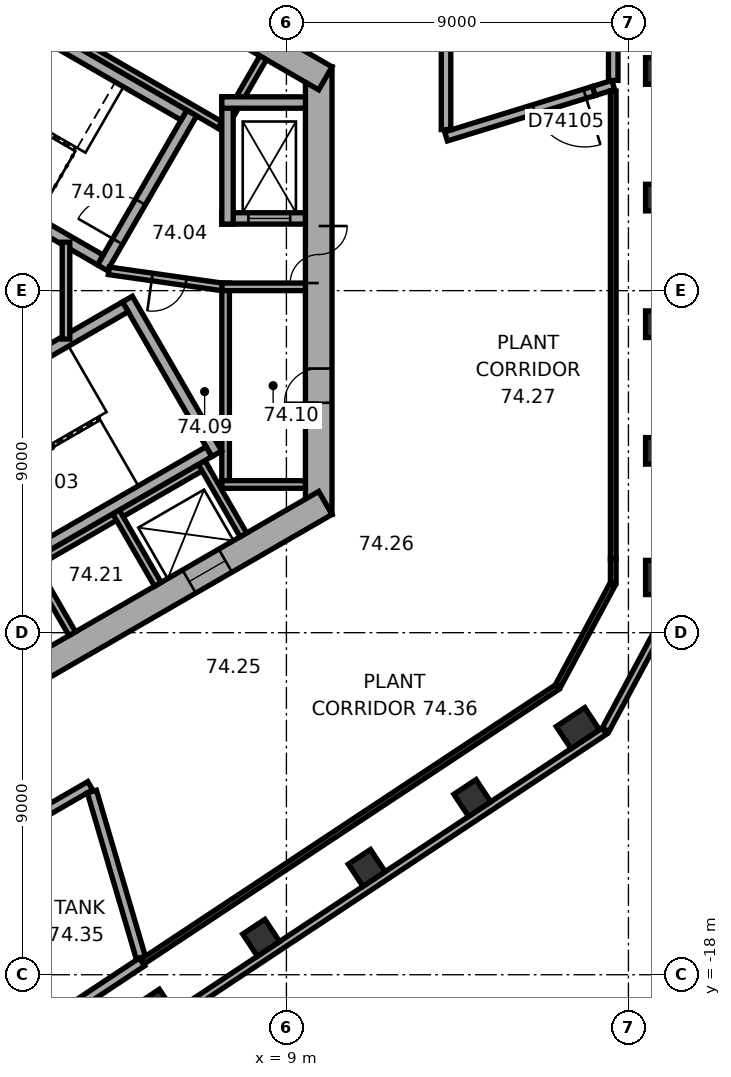
"""IFC4 building model, lengths in metres.
Left out: names, types, materials, properties, quantities, classifications, styles, units other than length and angle.
Written with IfcOpenShell. Run it as: python <this file> out.ifc"""

import sys

from ifc_helpers import new_model, si_unit, direction, frame, frame_2d, origin, origin_2d, place, context, subcontext, project, spatial, rectangle, extrude, element, fill, save


model = new_model("IFC4")
c1 = context("Model", 3, precision=1e-05, world=origin(), true_north=direction((0.0, 1.0)))
c2 = subcontext(c1, "Body", "Model", "MODEL_VIEW")
j1 = project(units=[si_unit("LENGTHUNIT", "METRE"), si_unit("PLANEANGLEUNIT", "RADIAN")], contexts=[c1])
p1 = place(None, origin())
s1 = spatial("IfcSite", under=j1, at=p1, CompositionType="ELEMENT")
p2 = place(p1, origin())
s2 = spatial("IfcBuilding", under=s1, at=p2, CompositionType="ELEMENT")
p3 = place(p2, frame((0.0, 0.0, 300.5)))
s3 = spatial("IfcBuildingStorey", under=s2, at=p3, CompositionType="ELEMENT", Elevation=300.5)
p4 = place(p3, frame((18.8, -7.547, 0.0), z_axis=(0.0, 0.0, 1.0), x_axis=(0.0, 1.0, 0.0)))
e1 = element("IfcColumn", 1, at=p4, inside=s3, PredefinedType="COLUMN", context=c2, shape_type="SweptSolid", body=[
    extrude(rectangle(XDim=0.9, YDim=0.7, at=origin_2d()), origin(), (0.0, 0.0, 1.0), 4.5),
])
for number, where, z_axis, x_axis in (
    (2, (18.8, -4.215, 0.0), (0.0, 0.0, 1.0), (0.0, 1.0, 0.0)),
    (3, (18.8, -0.883, 0.0), (0.0, 0.0, 1.0), (0.0, 1.0, 0.0)),
    (4, (18.8, 2.448, 0.0), (0.0, 0.0, 1.0), (0.0, 1.0, 0.0)),
    (5, (18.8, 5.78, 0.0), (0.0, 0.0, 1.0), (0.0, 1.0, 0.0)),
    (6, (5.557, -18.867, 0.0), (0.0, 0.0, 1.0), (0.834, 0.552, 0.0)),
    (7, (8.335, -17.028, 0.0), (0.0, 0.0, 1.0), (0.834, 0.552, 0.0)),
    (8, (11.113, -15.189, 0.0), (0.0, 0.0, 1.0), (0.834, 0.552, 0.0)),
    (9, (13.891, -13.351, 0.0), (0.0, 0.0, 1.0), (0.834, 0.552, 0.0)),
):
    element("IfcColumn", number, at=place(p3, frame(where, z_axis=z_axis, x_axis=x_axis)), inside=s3, PredefinedType="COLUMN", context=c2, shape_type="SweptSolid", body=[
        extrude(rectangle(XDim=0.7, YDim=0.7, at=origin_2d()), origin(), (0.0, 0.0, 1.0), 4.5),
    ])
p5 = place(p3, frame((16.669, -11.512, 0.0), z_axis=(0.0, 0.0, 1.0), x_axis=(0.833885822067, 0.551936985312, 0.0)))
e10 = element("IfcColumn", 10, at=p5, inside=s3, PredefinedType="COLUMN", context=c2, shape_type="SweptSolid", body=[
    extrude(rectangle(XDim=0.9, YDim=0.7, at=origin_2d()), origin(), (0.0, 0.0, 1.0), 4.5),
])
p6 = place(p3, frame((9.85, -5.889, 0.0), z_axis=(0.0, 0.0, 1.0), x_axis=(0.0, 1.0, 0.0)))
e11 = element("IfcWall", 11, at=p6, inside=s3, PredefinedType="SHEAR", context=c2, shape_type="SweptSolid", body=[
    extrude(rectangle(XDim=11.778, YDim=0.7, at=frame_2d((5.889, 0.0))), origin(), (0.0, 0.0, 1.0), 4.5),
])
p7 = place(p6, frame((6.089, 0.0, 0.0)))
e12 = element("IfcOpeningElement", 12, at=p7, cuts=e11, PredefinedType="OPENING", context=c2, shape_type="SweptSolid", body=[
    extrude(rectangle(XDim=1.5, YDim=2.1, at=frame_2d((0.75, 1.05))), frame((0.0, 0.36, 0.0), z_axis=(0.0, -1.0, 0.0), x_axis=(1.0, 0.0, 0.0)), (0.0, 0.0, 1.0), 0.72),
])
p8 = place(p6, frame((2.939, 0.0, 0.0)))
e13 = element("IfcOpeningElement", 13, at=p8, cuts=e11, PredefinedType="OPENING", context=c2, shape_type="SweptSolid", body=[
    extrude(rectangle(XDim=0.9, YDim=2.1, at=frame_2d((0.45, 1.05))), frame((0.0, 0.36, 0.0), z_axis=(0.0, -1.0, 0.0), x_axis=(1.0, 0.0, 0.0)), (0.0, 0.0, 1.0), 0.72),
])
p9 = place(p3, frame((10.025, 5.586, 0.0), z_axis=(0.0, 0.0, 1.0), x_axis=(-0.866026453023, 0.499998182661, 0.0)))
e14 = element("IfcWall", 14, at=p9, inside=s3, PredefinedType="SHEAR", context=c2, shape_type="SweptSolid", body=[
    extrude(rectangle(XDim=11.778, YDim=0.7, at=frame_2d((5.889, 0.0))), origin(), (0.0, 0.0, 1.0), 4.5),
])
p10 = place(p9, frame((3.839, 0.0, 0.0)))
e15 = element("IfcOpeningElement", 15, at=p10, cuts=e14, PredefinedType="OPENING", context=c2, shape_type="SweptSolid", body=[
    extrude(rectangle(XDim=0.9, YDim=2.1, at=frame_2d((0.45, 1.05))), frame((0.0, 0.36, 0.0), z_axis=(0.0, -1.0, 0.0), x_axis=(1.0, 0.0, 0.0)), (0.0, 0.0, 1.0), 0.72),
])
p11 = place(p9, frame((7.739, 0.0, 0.0)))
e16 = element("IfcOpeningElement", 16, at=p11, cuts=e14, PredefinedType="OPENING", context=c2, shape_type="SweptSolid", body=[
    extrude(rectangle(XDim=0.9, YDim=2.1, at=frame_2d((0.45, 1.05))), frame((0.0, 0.36, 0.0), z_axis=(0.0, -1.0, 0.0), x_axis=(1.0, 0.0, 0.0)), (0.0, 0.0, 1.0), 0.72),
])
p12 = place(p3, frame((-0.175, -11.475, 0.0), z_axis=(0.0, 0.0, 1.0), x_axis=(0.866026453023, 0.499998182661, 0.0)))
e17 = element("IfcWall", 17, at=p12, inside=s3, PredefinedType="SHEAR", context=c2, shape_type="SweptSolid", body=[
    extrude(rectangle(XDim=11.778, YDim=0.7, at=frame_2d((5.889, 0.0))), origin(), (0.0, 0.0, 1.0), 4.5),
])
p13 = place(p12, frame((7.639, 0.0, 0.0)))
e18 = element("IfcOpeningElement", 18, at=p13, cuts=e17, PredefinedType="OPENING", context=c2, shape_type="SweptSolid", body=[
    extrude(rectangle(XDim=1.1, YDim=2.1, at=frame_2d((0.55, 1.05))), frame((0.0, 0.36, 0.0), z_axis=(0.0, -1.0, 0.0), x_axis=(1.0, 0.0, 0.0)), (0.0, 0.0, 1.0), 0.72),
])
p14 = place(p3, frame((2.58, -21.377, 0.0), z_axis=(0.0, 0.0, 1.0), x_axis=(0.833888592176, 0.551932800112, 0.0)))
e19 = element("IfcWall", 19, at=p14, inside=s3, PredefinedType="STANDARD", context=c2, shape_type="SweptSolid", body=[
    extrude(rectangle(XDim=17.731, YDim=0.2, at=frame_2d((8.866, 0.0))), origin(), (0.0, 0.0, 1.0), 4.5),
])
p15 = place(p3, frame((17.399, -11.554, 0.0), z_axis=(0.0, 0.0, 1.0), x_axis=(0.473309051311, 0.880896442238, 0.0)))
e20 = element("IfcWall", 20, at=p15, inside=s3, PredefinedType="STANDARD", context=c2, shape_type="SweptSolid", body=[
    extrude(rectangle(XDim=3.886, YDim=0.2, at=frame_2d((1.943, 0.0))), origin(), (0.0, 0.0, 1.0), 4.5),
])
p16 = place(p3, frame((7.4, -5.2, 0.0), z_axis=(0.0, 0.0, 1.0), x_axis=(0.0, 1.0, 0.0)))
e21 = element("IfcWall", 21, at=p16, inside=s3, PredefinedType="PARTITIONING", context=c2, shape_type="SweptSolid", body=[
    extrude(rectangle(XDim=5.4, YDim=0.2, at=frame_2d((2.7, 0.0))), origin(), (0.0, 0.0, 1.0), 4.2),
])
for number, where, z_axis, x_axis in (
    (22, (7.3, -5.1, 0.0), (0.0, 0.0, 1.0), (1.0, 0.0, 0.0)),
    (23, (7.3, 0.1, 0.0), (0.0, 0.0, 1.0), (1.0, 0.0, 0.0)),
):
    element("IfcWall", number, at=place(p3, frame(where, z_axis=z_axis, x_axis=x_axis)), inside=s3, PredefinedType="PARTITIONING", context=c2, shape_type="SweptSolid", body=[
        extrude(rectangle(XDim=2.2, YDim=0.2, at=frame_2d((1.1, 0.0))), origin(), (0.0, 0.0, 1.0), 4.2),
    ])
p17 = place(p3, frame((7.424, 4.259, 0.0), z_axis=(0.0, 0.0, 1.0), x_axis=(-0.866026010844, 0.49999894854, 0.0)))
e24 = element("IfcWall", 24, at=p17, inside=s3, PredefinedType="PARTITIONING", context=c2, shape_type="SweptSolid", body=[
    extrude(rectangle(XDim=8.0, YDim=0.2, at=frame_2d((4.0, 0.0))), origin(), (0.0, 0.0, 1.0), 4.2),
])
p18 = place(p3, frame((7.287, 4.222, 0.0), z_axis=(0.0, 0.0, 1.0), x_axis=(0.499946605688, 0.86605622881, 0.0)))
e25 = element("IfcWall", 25, at=p18, inside=s3, PredefinedType="PARTITIONING", context=c2, shape_type="SweptSolid", body=[
    extrude(rectangle(XDim=2.2, YDim=0.2, at=frame_2d((1.1, 0.0))), origin(), (0.0, 0.0, 1.0), 4.2),
])
p19 = place(p3, frame((-0.024, -8.559, 0.0), z_axis=(0.0, 0.0, 1.0), x_axis=(0.866026010844, 0.49999894854, 0.0)))
e26 = element("IfcWall", 26, at=p19, inside=s3, PredefinedType="PARTITIONING", context=c2, shape_type="SweptSolid", body=[
    extrude(rectangle(XDim=8.0, YDim=0.2, at=frame_2d((4.0, 0.0))), origin(), (0.0, 0.0, 1.0), 4.2),
])
for number, where, z_axis, x_axis in (
    (27, (2.264, -7.122, 0.0), (0.0, 0.0, 1.0), (0.5, -0.866, 0.0)),
    (28, (4.516, -5.822, 0.0), (0.0, 0.0, 1.0), (0.5, -0.866, 0.0)),
    (29, (6.768, -4.522, 0.0), (0.0, 0.0, 1.0), (0.5, -0.866, 0.0)),
):
    element("IfcWall", number, at=place(p3, frame(where, z_axis=z_axis, x_axis=x_axis)), inside=s3, PredefinedType="PARTITIONING", context=c2, shape_type="SweptSolid", body=[
        extrude(rectangle(XDim=2.2, YDim=0.2, at=frame_2d((1.1, 0.0))), origin(), (0.0, 0.0, 1.0), 4.2),
    ])
p20 = place(p3, frame((4.158, 0.602, 0.0), z_axis=(0.0, 0.0, 1.0), x_axis=(0.499977259774, 0.866038532462, 0.0)))
e30 = element("IfcWall", 30, at=p20, inside=s3, PredefinedType="SHEAR", context=c2, shape_type="SweptSolid", body=[
    extrude(rectangle(XDim=4.7, YDim=0.3, at=frame_2d((2.35, 0.0))), origin(), (0.0, 0.0, 1.0), 4.5),
])
p21 = place(p20, frame((0.8, 0.0, 0.0)))
e31 = element("IfcOpeningElement", 31, at=p21, cuts=e30, PredefinedType="OPENING", context=c2, shape_type="SweptSolid", body=[
    extrude(rectangle(XDim=1.2, YDim=2.1, at=frame_2d((0.6, 1.05))), frame((0.0, 0.16, 0.0), z_axis=(0.0, -1.0, 0.0), x_axis=(1.0, 0.0, 0.0)), (0.0, 0.0, 1.0), 0.32),
])
for number, where, z_axis, x_axis in (
    (32, (4.103, 0.807, 0.0), (0.0, 0.0, 1.0), (-0.866, 0.5, 0.0)),
    (33, (6.303, 4.617, 0.0), (0.0, 0.0, 1.0), (-0.866, 0.5, 0.0)),
):
    element("IfcWall", number, at=place(p3, frame(where, z_axis=z_axis, x_axis=x_axis)), inside=s3, PredefinedType="SHEAR", context=c2, shape_type="SweptSolid", body=[
        extrude(rectangle(XDim=7.06, YDim=0.3, at=frame_2d((3.53, 0.0))), origin(), (0.0, 0.0, 1.0), 4.5),
    ])
p22 = place(p3, frame((4.816, -0.222, 0.0), z_axis=(0.0, 0.0, 1.0), x_axis=(0.499977259774, -0.866038532462, 0.0)))
e34 = element("IfcWall", 34, at=p22, inside=s3, PredefinedType="SHEAR", context=c2, shape_type="SweptSolid", body=[
    extrude(rectangle(XDim=4.7, YDim=0.3, at=frame_2d((2.35, 0.0))), origin(), (0.0, 0.0, 1.0), 4.5),
])
for number, where, z_axis, x_axis in (
    (35, (-1.353, -3.957, 0.0), (0.0, 0.0, 1.0), (0.866, 0.5, 0.0)),
    (36, (0.847, -7.767, 0.0), (0.0, 0.0, 1.0), (0.866, 0.5, 0.0)),
):
    element("IfcWall", number, at=place(p3, frame(where, z_axis=z_axis, x_axis=x_axis)), inside=s3, PredefinedType="SHEAR", context=c2, shape_type="SweptSolid", body=[
        extrude(rectangle(XDim=7.06, YDim=0.3, at=frame_2d((3.53, 0.0))), origin(), (0.0, 0.0, 1.0), 4.5),
    ])
p23 = place(p3, frame((7.3, 1.9, 0.0), z_axis=(0.0, 0.0, 1.0), x_axis=(1.0, 0.0, 0.0)))
e37 = element("IfcWall", 37, at=p23, inside=s3, PredefinedType="SHEAR", context=c2, shape_type="SweptSolid", body=[
    extrude(rectangle(XDim=2.2, YDim=0.3, at=frame_2d((1.1, 0.0))), origin(), (0.0, 0.0, 1.0), 4.2),
])
p24 = place(p23, frame((0.7, 0.0, 0.0)))
e38 = element("IfcOpeningElement", 38, at=p24, cuts=e37, PredefinedType="OPENING", context=c2, shape_type="SweptSolid", body=[
    extrude(rectangle(XDim=1.1, YDim=2.1, at=frame_2d((0.55, 1.05))), frame((0.0, 0.16, 0.0), z_axis=(0.0, -1.0, 0.0), x_axis=(1.0, 0.0, 0.0)), (0.0, 0.0, 1.0), 0.32),
])
p25 = place(p3, frame((7.45, 1.75, 0.0), z_axis=(0.0, 0.0, 1.0), x_axis=(0.0, 1.0, 0.0)))
e39 = element("IfcWall", 39, at=p25, inside=s3, PredefinedType="SHEAR", context=c2, shape_type="SweptSolid", body=[
    extrude(rectangle(XDim=3.35, YDim=0.3, at=frame_2d((1.675, 0.0))), origin(), (0.0, 0.0, 1.0), 4.2),
])
p26 = place(p3, frame((7.3, 4.95, 0.0), z_axis=(0.0, 0.0, 1.0), x_axis=(1.0, 0.0, 0.0)))
e40 = element("IfcWall", 40, at=p26, inside=s3, PredefinedType="SHEAR", context=c2, shape_type="SweptSolid", body=[
    extrude(rectangle(XDim=2.2, YDim=0.3, at=frame_2d((1.1, 0.0))), origin(), (0.0, 0.0, 1.0), 4.2),
])
p27 = place(p3, frame((4.327, 0.521, 0.0), z_axis=(0.0, 0.0, 1.0), x_axis=(0.990124376366, -0.14019172346, 0.0)))
e41 = element("IfcWall", 41, at=p27, inside=s3, PredefinedType="PARTITIONING", context=c2, shape_type="SweptSolid", body=[
    extrude(rectangle(XDim=3.002, YDim=0.2, at=frame_2d((1.501, 0.0))), origin(), (0.0, 0.0, 1.0), 4.2),
])
p28 = place(p27, frame((1.15, 0.0, 0.0)))
e42 = element("IfcOpeningElement", 42, at=p28, cuts=e41, PredefinedType="OPENING", context=c2, shape_type="SweptSolid", body=[
    extrude(rectangle(XDim=0.9, YDim=2.1, at=frame_2d((0.45, 1.05))), frame((0.0, 0.11, 0.0), z_axis=(0.0, -1.0, 0.0), x_axis=(1.0, 0.0, 0.0)), (0.0, 0.0, 1.0), 0.22),
])
p29 = place(p3, frame((3.2, -1.275, 0.0), z_axis=(0.0, 0.0, 1.0), x_axis=(0.0, 1.0, 0.0)))
e43 = element("IfcWall", 43, at=p29, inside=s3, PredefinedType="PARTITIONING", context=c2, shape_type="SweptSolid", body=[
    extrude(rectangle(XDim=2.549, YDim=0.2, at=frame_2d((1.275, 0.0))), origin(), (0.0, 0.0, 1.0), 4.2),
])
p30 = place(p3, frame((5.202, -17.663, 0.0), z_axis=(0.0, 0.0, 1.0), x_axis=(-0.833856881781, -0.551980706824, 0.0)))
e44 = element("IfcWall", 44, at=p30, inside=s3, PredefinedType="SOLIDWALL", context=c2, shape_type="SweptSolid", body=[
    extrude(rectangle(XDim=3.795, YDim=0.25, at=frame_2d((1.898, 0.0))), origin(), (0.0, 0.0, 1.0), 4.2),
])
p31 = place(p3, frame((0.087, -15.192, 0.0), z_axis=(0.0, 0.0, 1.0), x_axis=(0.866038167814, 0.4999778914, 0.0)))
e45 = element("IfcWall", 45, at=p31, inside=s3, PredefinedType="SOLIDWALL", context=c2, shape_type="SweptSolid", body=[
    extrude(rectangle(XDim=4.33, YDim=0.25, at=frame_2d((2.165, 0.0))), origin(), (0.0, 0.0, 1.0), 4.2),
])
p32 = place(p3, frame((3.882, -13.18, 0.0), z_axis=(0.0, 0.0, 1.0), x_axis=(0.282587245572, -0.959241600766, 0.0)))
e46 = element("IfcWall", 46, at=p32, inside=s3, PredefinedType="SOLIDWALL", context=c2, shape_type="SweptSolid", body=[
    extrude(rectangle(XDim=4.553, YDim=0.25, at=frame_2d((2.276, 0.0))), origin(), (0.0, 0.0, 1.0), 4.2),
])
p33 = place(p3, frame((16.13, -10.429, 0.0), z_axis=(0.0, 0.0, 1.0), x_axis=(-0.833865754552, -0.551967302822, 0.0)))
e47 = element("IfcWall", 47, at=p33, inside=s3, PredefinedType="PARTITIONING", context=c2, shape_type="SweptSolid", body=[
    extrude(rectangle(XDim=13.105, YDim=0.15, at=frame_2d((6.553, 0.0))), origin(), (0.0, 0.0, 1.0), 4.2),
])
p34 = place(p3, frame((17.581, -7.729, 0.0), z_axis=(0.0, 0.0, 1.0), x_axis=(-0.473358590991, -0.880869822581, 0.0)))
e48 = element("IfcWall", 48, at=p34, inside=s3, PredefinedType="PARTITIONING", context=c2, shape_type="SweptSolid", body=[
    extrude(rectangle(XDim=3.025, YDim=0.15, at=frame_2d((1.513, 0.0))), origin(), (0.0, 0.0, 1.0), 4.2),
])
p35 = place(p3, frame((17.6, -7.065, 0.0), z_axis=(0.0, 0.0, 1.0), x_axis=(0.0, -1.0, 0.0)))
e49 = element("IfcWall", 49, at=p35, inside=s3, PredefinedType="PARTITIONING", context=c2, shape_type="SweptSolid", body=[
    extrude(rectangle(XDim=0.629, YDim=0.15, at=frame_2d((0.314, 0.0))), origin(), (0.0, 0.0, 1.0), 4.2),
])
p36 = place(p3, frame((17.091, 5.254, 0.0), z_axis=(0.0, 0.0, 1.0), x_axis=(-0.955846412472, -0.293866697271, 0.0)))
e50 = element("IfcWall", 50, at=p36, inside=s3, PredefinedType="SOLIDWALL", context=c2, shape_type="SweptSolid", body=[
    extrude(rectangle(XDim=4.071, YDim=0.25, at=frame_2d((2.035, 0.0))), origin(), (0.0, 0.0, 1.0), 3.5),
])
p37 = place(p36, frame((0.25, 0.0, 0.0)))
e51 = element("IfcOpeningElement", 51, at=p37, cuts=e50, PredefinedType="OPENING", context=c2, shape_type="SweptSolid", body=[
    extrude(rectangle(XDim=1.4, YDim=2.1, at=frame_2d((0.7, 1.05))), frame((0.0, 0.135, 0.0), z_axis=(0.0, -1.0, 0.0), x_axis=(1.0, 0.0, 0.0)), (0.0, 0.0, 1.0), 0.27),
])
p38 = place(p3, frame((17.091, 5.254, 0.0), z_axis=(0.0, 0.0, 1.0), x_axis=(0.955848367703, 0.293860337505, 0.0)))
e52 = element("IfcWall", 52, at=p38, inside=s3, PredefinedType="SOLIDWALL", context=c2, shape_type="SweptSolid", body=[
    extrude(rectangle(XDim=0.532, YDim=0.25, at=frame_2d((0.266, 0.0))), origin(), (0.0, 0.0, 1.0), 3.5),
])
p39 = place(p3, frame((17.6, 5.251, 0.0), z_axis=(0.0, 0.0, 1.0), x_axis=(0.0, -1.0, 0.0)))
e53 = element("IfcWall", 53, at=p39, inside=s3, PredefinedType="PARTITIONING", context=c2, shape_type="SweptSolid", body=[
    extrude(rectangle(XDim=12.316, YDim=0.15, at=frame_2d((6.158, 0.0))), origin(), (0.0, 0.0, 1.0), 4.2),
])
p40 = place(p3, frame((13.2, 7.521, 0.0), z_axis=(0.0, 0.0, 1.0), x_axis=(0.0, -1.0, 0.0)))
e54 = element("IfcWall", 54, at=p40, inside=s3, PredefinedType="SOLIDWALL", context=c2, shape_type="SweptSolid", body=[
    extrude(rectangle(XDim=3.283, YDim=0.25, at=frame_2d((1.642, 0.0))), origin(), (0.0, 0.0, 1.0), 4.2),
])
p41 = place(p3, frame((17.6, 9.207, 0.0), z_axis=(0.0, 0.0, 1.0), x_axis=(0.0, -1.0, 0.0)))
e55 = element("IfcWall", 55, at=p41, inside=s3, PredefinedType="SOLIDWALL", context=c2, shape_type="SweptSolid", body=[
    extrude(rectangle(XDim=3.676, YDim=0.25, at=frame_2d((1.838, 0.0))), origin(), (0.0, 0.0, 1.0), 4.2),
])
p42 = place(p7, origin())
e56 = element("IfcDoor", 56, at=p42, inside=s3, OperationType="DOUBLE_DOOR_SINGLE_SWING", PredefinedType="DOOR", context=c2, shape_type="SweptSolid", body=[
    extrude(rectangle(XDim=1.5, YDim=2.1, at=frame_2d((0.75, 1.05))), frame((0.0, 0.025, 0.0), z_axis=(0.0, -1.0, 0.0), x_axis=(1.0, 0.0, 0.0)), (0.0, 0.0, 1.0), 0.05),
])
fill(e12, e56)
p43 = place(p21, origin())
e57 = element("IfcDoor", 57, at=p43, inside=s3, OperationType="SINGLE_SWING_RIGHT", PredefinedType="DOOR", context=c2, shape_type="SweptSolid", body=[
    extrude(rectangle(XDim=1.2, YDim=2.1, at=frame_2d((0.6, 1.05))), frame((0.0, 0.025, 0.0), z_axis=(0.0, -1.0, 0.0), x_axis=(1.0, 0.0, 0.0)), (0.0, 0.0, 1.0), 0.05),
])
fill(e31, e57)
p44 = place(p28, origin())
e58 = element("IfcDoor", 58, at=p44, inside=s3, OperationType="SINGLE_SWING_LEFT", PredefinedType="DOOR", context=c2, shape_type="SweptSolid", body=[
    extrude(rectangle(XDim=0.9, YDim=2.1, at=frame_2d((0.45, 1.05))), frame((0.0, 0.025, 0.0), z_axis=(0.0, -1.0, 0.0), x_axis=(1.0, 0.0, 0.0)), (0.0, 0.0, 1.0), 0.05),
])
fill(e42, e58)
p45 = place(p8, origin())
e59 = element("IfcDoor", 59, at=p45, inside=s3, OperationType="SINGLE_SWING_LEFT", PredefinedType="DOOR", context=c2, shape_type="SweptSolid", body=[
    extrude(rectangle(XDim=0.9, YDim=2.1, at=frame_2d((0.45, 1.05))), frame((0.0, 0.025, 0.0), z_axis=(0.0, -1.0, 0.0), x_axis=(1.0, 0.0, 0.0)), (0.0, 0.0, 1.0), 0.05),
])
fill(e13, e59)
p46 = place(p24, origin())
e60 = element("IfcDoor", 60, at=p46, inside=s3, OperationType="DOUBLE_DOOR_SLIDING", PredefinedType="DOOR", context=c2, shape_type="SweptSolid", body=[
    extrude(rectangle(XDim=1.1, YDim=2.1, at=frame_2d((0.55, 1.05))), frame((0.0, 0.025, 0.0), z_axis=(0.0, -1.0, 0.0), x_axis=(1.0, 0.0, 0.0)), (0.0, 0.0, 1.0), 0.05),
])
fill(e38, e60)
p47 = place(p13, origin())
e61 = element("IfcDoor", 61, at=p47, inside=s3, OperationType="DOUBLE_DOOR_SLIDING", PredefinedType="DOOR", context=c2, shape_type="SweptSolid", body=[
    extrude(rectangle(XDim=1.1, YDim=2.1, at=frame_2d((0.55, 1.05))), frame((0.0, 0.025, 0.0), z_axis=(0.0, -1.0, 0.0), x_axis=(1.0, 0.0, 0.0)), (0.0, 0.0, 1.0), 0.05),
])
fill(e18, e61)
p48 = place(p37, origin())
e62 = element("IfcDoor", 62, at=p48, inside=s3, OperationType="SINGLE_SWING_LEFT", PredefinedType="DOOR", context=c2, shape_type="SweptSolid", body=[
    extrude(rectangle(XDim=1.4, YDim=2.1, at=frame_2d((0.7, 1.05))), frame((0.0, 0.025, 0.0), z_axis=(0.0, -1.0, 0.0), x_axis=(1.0, 0.0, 0.0)), (0.0, 0.0, 1.0), 0.05),
])
fill(e51, e62)
save(model, sys.argv[1])
